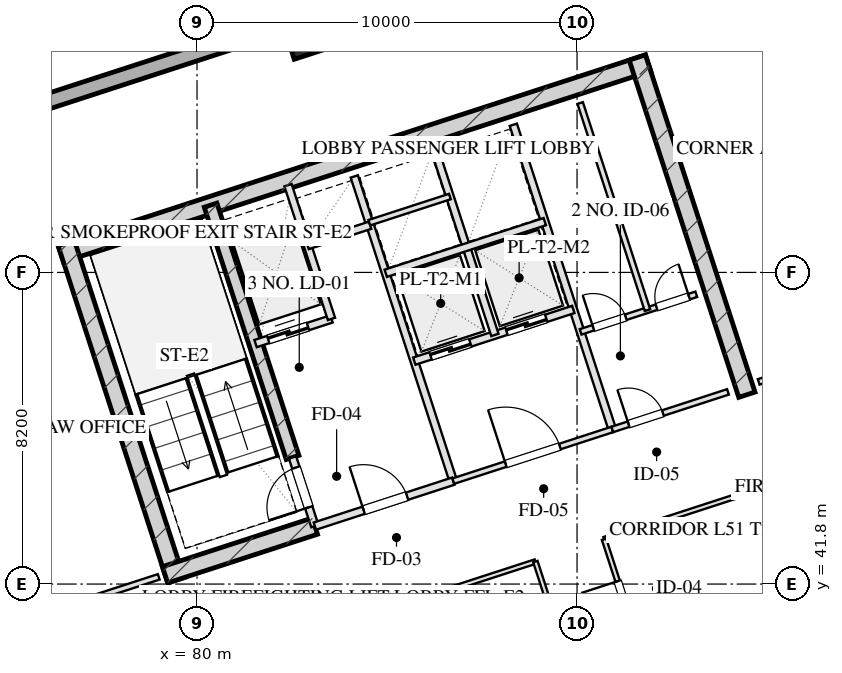
"""IFC4 building model, lengths in metres.
Left out: names, types, materials, properties, quantities, classifications, styles, units other than length and angle.
Written with IfcOpenShell. Run it as: python <this file> out.ifc"""

import sys

from ifc_helpers import new_model, si_unit, direction, frame, frame_2d, origin, origin_2d, place, context, subcontext, project, spatial, rectangle, hollow_rectangle, extrude, element, fill, save


model = new_model("IFC4")
c1 = context("Model", 3, precision=1e-05, world=origin(), true_north=direction((0.0, 1.0)))
c2 = subcontext(c1, "Body", "Model", "MODEL_VIEW")
j1 = project(units=[si_unit("LENGTHUNIT", "METRE"), si_unit("PLANEANGLEUNIT", "RADIAN")], contexts=[c1])
p1 = place(None, origin())
s1 = spatial("IfcSite", under=j1, at=p1, CompositionType="ELEMENT")
p2 = place(p1, origin())
s2 = spatial("IfcBuilding", under=s1, at=p2, CompositionType="ELEMENT")
p3 = place(p2, frame((0.0, 0.0, 192.05)))
s3 = spatial("IfcBuildingStorey", under=s2, at=p3, CompositionType="ELEMENT", Elevation=192.05)
p4 = place(p3, frame((76.415, 50.489, 0.0), z_axis=(0.0, 0.0, 1.0), x_axis=(0.951056810414, 0.309016089169, 0.0)))
e1 = element("IfcWall", 1, at=p4, inside=s3, PredefinedType="SHEAR", context=c2, shape_type="SweptSolid", body=[
    extrude(rectangle(XDim=16.25, YDim=0.45, at=frame_2d((8.125, 0.0))), origin(), (0.0, 0.0, 1.0), 3.45),
])
for number, where, z_axis, x_axis in (
    (2, (79.442, 41.899, 0.0), (0.0, 0.0, 1.0), (-0.309, 0.951, 0.0)),
    (3, (94.469, 46.781, 0.0), (0.0, 0.0, 1.0), (-0.309, 0.951, 0.0)),
):
    element("IfcWall", number, at=place(p3, frame(where, z_axis=z_axis, x_axis=x_axis)), inside=s3, PredefinedType="SHEAR", context=c2, shape_type="SweptSolid", body=[
        extrude(rectangle(XDim=9.33, YDim=0.45, at=frame_2d((4.665, 0.0))), origin(), (0.0, 0.0, 1.0), 3.45),
    ])
p5 = place(p3, frame((82.514, 45.131, 0.0), z_axis=(0.0, 0.0, 1.0), x_axis=(-0.308988790936, 0.951065679686, 0.0)))
e4 = element("IfcWall", 4, at=p5, inside=s3, PredefinedType="SHEAR", context=c2, shape_type="SweptSolid", body=[
    extrude(rectangle(XDim=6.98, YDim=0.35, at=frame_2d((3.49, 0.0))), origin(), (0.0, 0.0, 1.0), 3.45),
])
p6 = place(p3, frame((79.159, 42.043, 0.0), z_axis=(0.0, 0.0, 1.0), x_axis=(0.951047485828, 0.309044785913, 0.0)))
e5 = element("IfcWall", 5, at=p6, inside=s3, PredefinedType="SHEAR", context=c2, shape_type="SweptSolid", body=[
    extrude(rectangle(XDim=4.145, YDim=0.45, at=frame_2d((2.073, 0.0))), origin(), (0.0, 0.0, 1.0), 3.45),
])
p7 = place(p3, frame((82.815, 56.112, 0.0), z_axis=(0.0, 0.0, 1.0), x_axis=(0.951056516295, 0.309016994375, 0.0)))
e6 = element("IfcColumn", 6, at=p7, inside=s3, PredefinedType="COLUMN", context=c2, shape_type="SweptSolid", body=[
    extrude(hollow_rectangle(XDim=0.8, YDim=0.8, WallThickness=0.028, at=origin_2d()), origin(), (0.0, 0.0, 1.0), 3.451),
])
p8 = place(p3, frame((81.776, 8.827, 0.0), z_axis=(0.0, 0.0, 1.0), x_axis=(-0.309014228706, 0.951057414911, 0.0)))
e7 = element("IfcWall", 7, at=p8, inside=s3, PredefinedType="SOLIDWALL", context=c2, shape_type="SweptSolid", body=[
    extrude(rectangle(XDim=42.8, YDim=0.4, at=frame_2d((21.4, 0.0))), origin(), (0.0, 0.0, 1.0), 2.61),
])
p9 = place(p8, frame((13.95, 0.0, 0.75)))
e8 = element("IfcOpeningElement", 8, at=p9, cuts=e7, PredefinedType="OPENING", context=c2, shape_type="SweptSolid", body=[
    extrude(rectangle(XDim=2.1, YDim=1.46, at=frame_2d((1.05, 0.73))), frame((0.0, 0.21, 0.0), z_axis=(0.0, -1.0, 0.0), x_axis=(1.0, 0.0, 0.0)), (0.0, 0.0, 1.0), 0.42),
])
p10 = place(p8, frame((17.75, 0.0, 0.75)))
e9 = element("IfcOpeningElement", 9, at=p10, cuts=e7, PredefinedType="OPENING", context=c2, shape_type="SweptSolid", body=[
    extrude(rectangle(XDim=2.1, YDim=1.46, at=frame_2d((1.05, 0.73))), frame((0.0, 0.21, 0.0), z_axis=(0.0, -1.0, 0.0), x_axis=(1.0, 0.0, 0.0)), (0.0, 0.0, 1.0), 0.42),
])
p11 = place(p8, frame((22.95, 0.0, 0.75)))
e10 = element("IfcOpeningElement", 10, at=p11, cuts=e7, PredefinedType="OPENING", context=c2, shape_type="SweptSolid", body=[
    extrude(rectangle(XDim=2.1, YDim=1.46, at=frame_2d((1.05, 0.73))), frame((0.0, 0.21, 0.0), z_axis=(0.0, -1.0, 0.0), x_axis=(1.0, 0.0, 0.0)), (0.0, 0.0, 1.0), 0.42),
])
p12 = place(p8, frame((26.75, 0.0, 0.75)))
e11 = element("IfcOpeningElement", 11, at=p12, cuts=e7, PredefinedType="OPENING", context=c2, shape_type="SweptSolid", body=[
    extrude(rectangle(XDim=2.1, YDim=1.46, at=frame_2d((1.05, 0.73))), frame((0.0, 0.21, 0.0), z_axis=(0.0, -1.0, 0.0), x_axis=(1.0, 0.0, 0.0)), (0.0, 0.0, 1.0), 0.42),
])
p13 = place(p3, frame((70.092, 52.556, 0.0), z_axis=(0.0, 0.0, 1.0), x_axis=(0.951057580055, 0.30901372044, 0.0)))
e12 = element("IfcWall", 12, at=p13, inside=s3, PredefinedType="SOLIDWALL", context=c2, shape_type="SweptSolid", body=[
    extrude(rectangle(XDim=26.4, YDim=0.4, at=frame_2d((13.2, 0.0))), origin(), (0.0, 0.0, 1.0), 2.61),
])
p14 = place(p3, frame((83.101, 43.324, 0.0), z_axis=(0.0, 0.0, 1.0), x_axis=(-0.309048298632, 0.951046344356, 0.0)))
e13 = element("IfcWall", 13, at=p14, inside=s3, PredefinedType="PARTITIONING", context=c2, shape_type="SweptSolid", body=[
    extrude(rectangle(XDim=1.9, YDim=0.2, at=frame_2d((0.95, 0.0))), origin(), (0.0, 0.0, 1.0), 3.175),
])
p15 = place(p14, frame((0.52, 0.0, 0.0)))
e14 = element("IfcOpeningElement", 14, at=p15, cuts=e13, PredefinedType="OPENING", context=c2, shape_type="SweptSolid", body=[
    extrude(rectangle(XDim=1.1, YDim=2.05, at=frame_2d((0.55, 1.025))), frame((0.0, 0.11, 0.0), z_axis=(0.0, -1.0, 0.0), x_axis=(1.0, 0.0, 0.0)), (0.0, 0.0, 1.0), 0.22),
])
p16 = place(p3, frame((86.743, 44.508, 0.0), z_axis=(0.0, 0.0, 1.0), x_axis=(-0.309016001439, 0.951056838919, 0.0)))
e15 = element("IfcWall", 15, at=p16, inside=s3, PredefinedType="PARTITIONING", context=c2, shape_type="SweptSolid", body=[
    extrude(rectangle(XDim=8.43, YDim=0.2, at=frame_2d((4.215, 0.0))), origin(), (0.0, 0.0, 1.0), 3.175),
])
p17 = place(p3, frame((83.101, 43.324, 0.0), z_axis=(0.0, 0.0, 1.0), x_axis=(0.951052804469, 0.309028417967, 0.0)))
e16 = element("IfcWall", 16, at=p17, inside=s3, PredefinedType="PARTITIONING", context=c2, shape_type="SweptSolid", body=[
    extrude(rectangle(XDim=3.83, YDim=0.2, at=frame_2d((1.915, 0.0))), origin(), (0.0, 0.0, 1.0), 3.175),
])
p18 = place(p17, frame((1.35, 0.0, 0.0)))
e17 = element("IfcOpeningElement", 17, at=p18, cuts=e16, PredefinedType="OPENING", context=c2, shape_type="SweptSolid", body=[
    extrude(rectangle(XDim=1.2, YDim=2.05, at=frame_2d((0.6, 1.025))), frame((0.0, 0.11, 0.0), z_axis=(0.0, -1.0, 0.0), x_axis=(1.0, 0.0, 0.0)), (0.0, 0.0, 1.0), 0.22),
])
p19 = place(p3, frame((81.54, 48.127, 0.0), z_axis=(0.0, 0.0, 1.0), x_axis=(0.951062257173, 0.308999325213, 0.0)))
e18 = element("IfcWall", 18, at=p19, inside=s3, PredefinedType="PARTITIONING", context=c2, shape_type="SweptSolid", body=[
    extrude(rectangle(XDim=2.1, YDim=0.2, at=frame_2d((1.05, 0.0))), origin(), (0.0, 0.0, 1.0), 3.175),
])
p20 = place(p19, frame((0.35, 0.0, 0.0)))
e19 = element("IfcOpeningElement", 19, at=p20, cuts=e18, PredefinedType="OPENING", context=c2, shape_type="SweptSolid", body=[
    extrude(rectangle(XDim=1.1, YDim=2.05, at=frame_2d((0.55, 1.025))), frame((0.0, 0.11, 0.0), z_axis=(0.0, -1.0, 0.0), x_axis=(1.0, 0.0, 0.0)), (0.0, 0.0, 1.0), 0.22),
])
p21 = place(p3, frame((83.538, 48.776, 0.0), z_axis=(0.0, 0.0, 1.0), x_axis=(-0.3089935693, 0.951064127245, 0.0)))
e20 = element("IfcWall", 20, at=p21, inside=s3, PredefinedType="PARTITIONING", context=c2, shape_type="SweptSolid", body=[
    extrude(rectangle(XDim=3.7, YDim=0.2, at=frame_2d((1.85, 0.0))), origin(), (0.0, 0.0, 1.0), 3.175),
])
p22 = place(p3, frame((82.91, 50.707, 0.0), z_axis=(0.0, 0.0, 1.0), x_axis=(0.951041328149, 0.309063734775, 0.0)))
e21 = element("IfcWall", 21, at=p22, inside=s3, PredefinedType="PARTITIONING", context=c2, shape_type="SweptSolid", body=[
    extrude(rectangle(XDim=1.73, YDim=0.2, at=frame_2d((0.865, 0.0))), origin(), (0.0, 0.0, 1.0), 3.175),
])
p23 = place(p3, frame((90.928, 45.868, 0.0), z_axis=(0.0, 0.0, 1.0), x_axis=(-0.309042196757, 0.951048327176, 0.0)))
e22 = element("IfcWall", 22, at=p23, inside=s3, PredefinedType="PARTITIONING", context=c2, shape_type="SweptSolid", body=[
    extrude(rectangle(XDim=8.43, YDim=0.2, at=frame_2d((4.215, 0.0))), origin(), (0.0, 0.0, 1.0), 3.175),
])
p24 = place(p3, frame((86.743, 44.508, 0.0), z_axis=(0.0, 0.0, 1.0), x_axis=(0.951063829732, 0.308994485023, 0.0)))
e23 = element("IfcWall", 23, at=p24, inside=s3, PredefinedType="PARTITIONING", context=c2, shape_type="SweptSolid", body=[
    extrude(rectangle(XDim=4.4, YDim=0.15, at=frame_2d((2.2, 0.0))), origin(), (0.0, 0.0, 1.0), 3.175),
])
p25 = place(p24, frame((1.45, 0.0, 0.0)))
e24 = element("IfcOpeningElement", 24, at=p25, cuts=e23, PredefinedType="OPENING", context=c2, shape_type="SweptSolid", body=[
    extrude(rectangle(XDim=1.5, YDim=2.05, at=frame_2d((0.75, 1.025))), frame((0.0, 0.085, 0.0), z_axis=(0.0, -1.0, 0.0), x_axis=(1.0, 0.0, 0.0)), (0.0, 0.0, 1.0), 0.17),
])
p26 = place(p3, frame((85.718, 47.666, 0.0), z_axis=(0.0, 0.0, 1.0), x_axis=(0.951058531764, 0.30901079133, 0.0)))
e25 = element("IfcWall", 25, at=p26, inside=s3, PredefinedType="PARTITIONING", context=c2, shape_type="SweptSolid", body=[
    extrude(rectangle(XDim=4.4, YDim=0.2, at=frame_2d((2.2, 0.0))), origin(), (0.0, 0.0, 1.0), 3.175),
])
p27 = place(p26, frame((0.45, 0.0, 0.0)))
e26 = element("IfcOpeningElement", 26, at=p27, cuts=e25, PredefinedType="OPENING", context=c2, shape_type="SweptSolid", body=[
    extrude(rectangle(XDim=1.1, YDim=2.05, at=frame_2d((0.55, 1.025))), frame((0.0, 0.11, 0.0), z_axis=(0.0, -1.0, 0.0), x_axis=(1.0, 0.0, 0.0)), (0.0, 0.0, 1.0), 0.22),
])
p28 = place(p26, frame((2.55, 0.0, 0.0)))
e27 = element("IfcOpeningElement", 27, at=p28, cuts=e25, PredefinedType="OPENING", context=c2, shape_type="SweptSolid", body=[
    extrude(rectangle(XDim=1.1, YDim=2.05, at=frame_2d((0.55, 1.025))), frame((0.0, 0.11, 0.0), z_axis=(0.0, -1.0, 0.0), x_axis=(1.0, 0.0, 0.0)), (0.0, 0.0, 1.0), 0.22),
])
p29 = place(p3, frame((87.838, 48.354, 0.0), z_axis=(0.0, 0.0, 1.0), x_axis=(-0.3090093719, 0.951058992953, 0.0)))
e28 = element("IfcWall", 28, at=p29, inside=s3, PredefinedType="PARTITIONING", context=c2, shape_type="SweptSolid", body=[
    extrude(rectangle(XDim=5.11, YDim=0.2, at=frame_2d((2.555, 0.0))), origin(), (0.0, 0.0, 1.0), 3.175),
])
p30 = place(p3, frame((84.967, 49.977, 0.0), z_axis=(0.0, 0.0, 1.0), x_axis=(0.951063829732, 0.308994485023, 0.0)))
e29 = element("IfcWall", 29, at=p30, inside=s3, PredefinedType="PARTITIONING", context=c2, shape_type="SweptSolid", body=[
    extrude(rectangle(XDim=4.4, YDim=0.2, at=frame_2d((2.2, 0.0))), origin(), (0.0, 0.0, 1.0), 3.175),
])
p31 = place(p3, frame((84.534, 51.308, 0.0), z_axis=(0.0, 0.0, 1.0), x_axis=(0.951075093106, 0.308959814982, 0.0)))
e30 = element("IfcWall", 30, at=p31, inside=s3, PredefinedType="PARTITIONING", context=c2, shape_type="SweptSolid", body=[
    extrude(rectangle(XDim=2.23, YDim=0.15, at=frame_2d((1.115, 0.0))), origin(), (0.0, 0.0, 1.0), 3.175),
])
p32 = place(p3, frame((90.928, 45.868, 0.0), z_axis=(0.0, 0.0, 1.0), x_axis=(0.951059297078, 0.309008435874, 0.0)))
e31 = element("IfcWall", 31, at=p32, inside=s3, PredefinedType="PARTITIONING", context=c2, shape_type="SweptSolid", body=[
    extrude(rectangle(XDim=3.2, YDim=0.15, at=frame_2d((1.6, 0.0))), origin(), (0.0, 0.0, 1.0), 3.175),
])
p33 = place(p32, frame((0.45, 0.0, 0.0)))
e32 = element("IfcOpeningElement", 32, at=p33, cuts=e31, PredefinedType="OPENING", context=c2, shape_type="SweptSolid", body=[
    extrude(rectangle(XDim=0.95, YDim=2.05, at=frame_2d((0.475, 1.025))), frame((0.0, 0.085, 0.0), z_axis=(0.0, -1.0, 0.0), x_axis=(1.0, 0.0, 0.0)), (0.0, 0.0, 1.0), 0.17),
])
p34 = place(p3, frame((90.094, 48.436, 0.0), z_axis=(0.0, 0.0, 1.0), x_axis=(0.951066581729, 0.308986014439, 0.0)))
e33 = element("IfcWall", 33, at=p34, inside=s3, PredefinedType="PARTITIONING", context=c2, shape_type="SweptSolid", body=[
    extrude(rectangle(XDim=3.2, YDim=0.15, at=frame_2d((1.6, 0.0))), origin(), (0.0, 0.0, 1.0), 3.175),
])
p35 = place(p34, frame((0.35, 0.0, 0.0)))
e34 = element("IfcOpeningElement", 34, at=p35, cuts=e33, PredefinedType="OPENING", context=c2, shape_type="SweptSolid", body=[
    extrude(rectangle(XDim=0.9, YDim=2.05, at=frame_2d((0.45, 1.025))), frame((0.0, 0.085, 0.0), z_axis=(0.0, -1.0, 0.0), x_axis=(1.0, 0.0, 0.0)), (0.0, 0.0, 1.0), 0.17),
])
p36 = place(p34, frame((2.1, 0.0, 0.0)))
e35 = element("IfcOpeningElement", 35, at=p36, cuts=e33, PredefinedType="OPENING", context=c2, shape_type="SweptSolid", body=[
    extrude(rectangle(XDim=0.9, YDim=2.05, at=frame_2d((0.45, 1.025))), frame((0.0, 0.085, 0.0), z_axis=(0.0, -1.0, 0.0), x_axis=(1.0, 0.0, 0.0)), (0.0, 0.0, 1.0), 0.17),
])
p37 = place(p3, frame((91.853, 49.007, 0.0), z_axis=(0.0, 0.0, 1.0), x_axis=(-0.309022487551, 0.951054731437, 0.0)))
e36 = element("IfcWall", 36, at=p37, inside=s3, PredefinedType="PARTITIONING", context=c2, shape_type="SweptSolid", body=[
    extrude(rectangle(XDim=5.73, YDim=0.15, at=frame_2d((2.865, 0.0))), origin(), (0.0, 0.0, 1.0), 3.175),
])
p38 = place(p3, frame((71.955, 39.703, 0.0), z_axis=(0.0, 0.0, 1.0), x_axis=(0.951060977215, 0.309003264738, 0.0)))
e37 = element("IfcWall", 37, at=p38, inside=s3, PredefinedType="PARTITIONING", context=c2, shape_type="SweptSolid", body=[
    extrude(rectangle(XDim=7.4, YDim=0.15, at=frame_2d((3.7, 0.0))), origin(), (0.0, 0.0, 1.0), 3.175),
])
p39 = place(p38, frame((3.108, 0.0, 0.0)))
e38 = element("IfcOpeningElement", 38, at=p39, cuts=e37, PredefinedType="OPENING", context=c2, shape_type="SweptSolid", body=[
    extrude(rectangle(XDim=1.0, YDim=2.05, at=frame_2d((0.5, 1.025))), frame((0.0, 0.085, 0.0), z_axis=(0.0, -1.0, 0.0), x_axis=(1.0, 0.0, 0.0)), (0.0, 0.0, 1.0), 0.17),
])
p40 = place(p3, frame((94.78, 47.119, 0.0), z_axis=(0.0, 0.0, 1.0), x_axis=(0.951057811516, 0.309013008068, 0.0)))
e39 = element("IfcWall", 39, at=p40, inside=s3, PredefinedType="PARTITIONING", context=c2, shape_type="SweptSolid", body=[
    extrude(rectangle(XDim=6.8, YDim=0.15, at=frame_2d((3.4, 0.0))), origin(), (0.0, 0.0, 1.0), 3.175),
])
p41 = place(p40, frame((2.856, 0.0, 0.0)))
e40 = element("IfcOpeningElement", 40, at=p41, cuts=e39, PredefinedType="OPENING", context=c2, shape_type="SweptSolid", body=[
    extrude(rectangle(XDim=1.0, YDim=2.05, at=frame_2d((0.5, 1.025))), frame((0.0, 0.085, 0.0), z_axis=(0.0, -1.0, 0.0), x_axis=(1.0, 0.0, 0.0)), (0.0, 0.0, 1.0), 0.17),
])
p42 = place(p3, frame((83.672, 40.692, 0.0), z_axis=(0.0, 0.0, 1.0), x_axis=(0.951048747115, 0.30904090443, 0.0)))
e41 = element("IfcWall", 41, at=p42, inside=s3, PredefinedType="PARTITIONING", context=c2, shape_type="SweptSolid", body=[
    extrude(rectangle(XDim=5.5, YDim=0.12, at=frame_2d((2.75, 0.0))), origin(), (0.0, 0.0, 1.0), 3.175),
])
p43 = place(p3, frame((90.71, 42.979, 0.0), z_axis=(0.0, 0.0, 1.0), x_axis=(0.95105853842, 0.309010770845, 0.0)))
e42 = element("IfcWall", 42, at=p43, inside=s3, PredefinedType="PARTITIONING", context=c2, shape_type="SweptSolid", body=[
    extrude(rectangle(XDim=11.95, YDim=0.12, at=frame_2d((5.975, 0.0))), origin(), (0.0, 0.0, 1.0), 3.175),
])
p44 = place(p3, frame((94.045, 26.566, 0.0), z_axis=(0.0, 0.0, 1.0), x_axis=(-0.30901773025, 0.951056277195, 0.0)))
e43 = element("IfcWall", 43, at=p44, inside=s3, PredefinedType="PARTITIONING", context=c2, shape_type="SweptSolid", body=[
    extrude(rectangle(XDim=16.64, YDim=0.12, at=frame_2d((8.32, 0.0))), origin(), (0.0, 0.0, 1.0), 3.175),
])
p45 = place(p3, frame((95.852, 27.153, 0.0), z_axis=(0.0, 0.0, 1.0), x_axis=(-0.309004459387, 0.951060589068, 0.0)))
e44 = element("IfcWall", 44, at=p45, inside=s3, PredefinedType="PARTITIONING", context=c2, shape_type="SweptSolid", body=[
    extrude(rectangle(XDim=16.64, YDim=0.12, at=frame_2d((8.32, 0.0))), origin(), (0.0, 0.0, 1.0), 3.175),
])
p46 = place(p45, frame((1.16, 0.0, 0.0)))
e45 = element("IfcOpeningElement", 45, at=p46, cuts=e44, PredefinedType="OPENING", context=c2, shape_type="SweptSolid", body=[
    extrude(rectangle(XDim=1.0, YDim=2.05, at=frame_2d((0.5, 1.025))), frame((0.0, 0.07, 0.0), z_axis=(0.0, -1.0, 0.0), x_axis=(1.0, 0.0, 0.0)), (0.0, 0.0, 1.0), 0.14),
])
p47 = place(p45, frame((4.72, 0.0, 0.0)))
e46 = element("IfcOpeningElement", 46, at=p47, cuts=e44, PredefinedType="OPENING", context=c2, shape_type="SweptSolid", body=[
    extrude(rectangle(XDim=1.0, YDim=2.05, at=frame_2d((0.5, 1.025))), frame((0.0, 0.07, 0.0), z_axis=(0.0, -1.0, 0.0), x_axis=(1.0, 0.0, 0.0)), (0.0, 0.0, 1.0), 0.14),
])
p48 = place(p45, frame((7.82, 0.0, 0.0)))
e47 = element("IfcOpeningElement", 47, at=p48, cuts=e44, PredefinedType="OPENING", context=c2, shape_type="SweptSolid", body=[
    extrude(rectangle(XDim=1.0, YDim=2.05, at=frame_2d((0.5, 1.025))), frame((0.0, 0.07, 0.0), z_axis=(0.0, -1.0, 0.0), x_axis=(1.0, 0.0, 0.0)), (0.0, 0.0, 1.0), 0.14),
])
p49 = place(p45, frame((10.92, 0.0, 0.0)))
e48 = element("IfcOpeningElement", 48, at=p49, cuts=e44, PredefinedType="OPENING", context=c2, shape_type="SweptSolid", body=[
    extrude(rectangle(XDim=1.0, YDim=2.05, at=frame_2d((0.5, 1.025))), frame((0.0, 0.07, 0.0), z_axis=(0.0, -1.0, 0.0), x_axis=(1.0, 0.0, 0.0)), (0.0, 0.0, 1.0), 0.14),
])
p50 = place(p45, frame((14.48, 0.0, 0.0)))
e49 = element("IfcOpeningElement", 49, at=p50, cuts=e44, PredefinedType="OPENING", context=c2, shape_type="SweptSolid", body=[
    extrude(rectangle(XDim=1.0, YDim=2.05, at=frame_2d((0.5, 1.025))), frame((0.0, 0.07, 0.0), z_axis=(0.0, -1.0, 0.0), x_axis=(1.0, 0.0, 0.0)), (0.0, 0.0, 1.0), 0.14),
])
p51 = place(p3, frame((91.736, 39.821, 0.0), z_axis=(0.0, 0.0, 1.0), x_axis=(0.951052534024, 0.309029250277, 0.0)))
e50 = element("IfcWall", 50, at=p51, inside=s3, PredefinedType="PARTITIONING", context=c2, shape_type="SweptSolid", body=[
    extrude(rectangle(XDim=11.95, YDim=0.12, at=frame_2d((5.975, 0.0))), origin(), (0.0, 0.0, 1.0), 3.175),
])
p52 = place(p15, origin())
e51 = element("IfcDoor", 51, at=p52, inside=s3, OperationType="SINGLE_SWING_LEFT", PredefinedType="DOOR", context=c2, shape_type="SweptSolid", body=[
    extrude(rectangle(XDim=1.1, YDim=2.05, at=frame_2d((0.55, 1.025))), frame((0.0, 0.025, 0.0), z_axis=(0.0, -1.0, 0.0), x_axis=(1.0, 0.0, 0.0)), (0.0, 0.0, 1.0), 0.05),
])
fill(e14, e51)
p53 = place(p18, origin())
e52 = element("IfcDoor", 52, at=p53, inside=s3, OperationType="SINGLE_SWING_LEFT", PredefinedType="DOOR", context=c2, shape_type="SweptSolid", body=[
    extrude(rectangle(XDim=1.2, YDim=2.05, at=frame_2d((0.6, 1.025))), frame((0.0, 0.025, 0.0), z_axis=(0.0, -1.0, 0.0), x_axis=(1.0, 0.0, 0.0)), (0.0, 0.0, 1.0), 0.05),
])
fill(e17, e52)
p54 = place(p20, origin())
e53 = element("IfcDoor", 53, at=p54, inside=s3, OperationType="DOUBLE_DOOR_SLIDING", PredefinedType="DOOR", context=c2, shape_type="SweptSolid", body=[
    extrude(rectangle(XDim=1.1, YDim=2.05, at=frame_2d((0.55, 1.025))), frame((0.0, 0.025, 0.0), z_axis=(0.0, -1.0, 0.0), x_axis=(1.0, 0.0, 0.0)), (0.0, 0.0, 1.0), 0.05),
])
fill(e19, e53)
p55 = place(p25, origin())
e54 = element("IfcDoor", 54, at=p55, inside=s3, OperationType="SINGLE_SWING_LEFT", PredefinedType="DOOR", context=c2, shape_type="SweptSolid", body=[
    extrude(rectangle(XDim=1.5, YDim=2.05, at=frame_2d((0.75, 1.025))), frame((0.0, 0.025, 0.0), z_axis=(0.0, -1.0, 0.0), x_axis=(1.0, 0.0, 0.0)), (0.0, 0.0, 1.0), 0.05),
])
fill(e24, e54)
p56 = place(p27, origin())
e55 = element("IfcDoor", 55, at=p56, inside=s3, OperationType="DOUBLE_DOOR_SLIDING", PredefinedType="DOOR", context=c2, shape_type="SweptSolid", body=[
    extrude(rectangle(XDim=1.1, YDim=2.05, at=frame_2d((0.55, 1.025))), frame((0.0, 0.025, 0.0), z_axis=(0.0, -1.0, 0.0), x_axis=(1.0, 0.0, 0.0)), (0.0, 0.0, 1.0), 0.05),
])
fill(e26, e55)
p57 = place(p28, origin())
e56 = element("IfcDoor", 56, at=p57, inside=s3, OperationType="DOUBLE_DOOR_SLIDING", PredefinedType="DOOR", context=c2, shape_type="SweptSolid", body=[
    extrude(rectangle(XDim=1.1, YDim=2.05, at=frame_2d((0.55, 1.025))), frame((0.0, 0.025, 0.0), z_axis=(0.0, -1.0, 0.0), x_axis=(1.0, 0.0, 0.0)), (0.0, 0.0, 1.0), 0.05),
])
fill(e27, e56)
p58 = place(p33, origin())
e57 = element("IfcDoor", 57, at=p58, inside=s3, OperationType="SINGLE_SWING_LEFT", PredefinedType="DOOR", context=c2, shape_type="SweptSolid", body=[
    extrude(rectangle(XDim=0.95, YDim=2.05, at=frame_2d((0.475, 1.025))), frame((0.0, 0.025, 0.0), z_axis=(0.0, -1.0, 0.0), x_axis=(1.0, 0.0, 0.0)), (0.0, 0.0, 1.0), 0.05),
])
fill(e32, e57)
p59 = place(p35, origin())
e58 = element("IfcDoor", 58, at=p59, inside=s3, OperationType="SINGLE_SWING_LEFT", PredefinedType="DOOR", context=c2, shape_type="SweptSolid", body=[
    extrude(rectangle(XDim=0.9, YDim=2.05, at=frame_2d((0.45, 1.025))), frame((0.0, 0.025, 0.0), z_axis=(0.0, -1.0, 0.0), x_axis=(1.0, 0.0, 0.0)), (0.0, 0.0, 1.0), 0.05),
])
fill(e34, e58)
p60 = place(p36, origin())
e59 = element("IfcDoor", 59, at=p60, inside=s3, OperationType="SINGLE_SWING_RIGHT", PredefinedType="DOOR", context=c2, shape_type="SweptSolid", body=[
    extrude(rectangle(XDim=0.9, YDim=2.05, at=frame_2d((0.45, 1.025))), frame((0.0, 0.025, 0.0), z_axis=(0.0, -1.0, 0.0), x_axis=(1.0, 0.0, 0.0)), (0.0, 0.0, 1.0), 0.05),
])
fill(e35, e59)
p61 = place(p50, origin())
e60 = element("IfcDoor", 60, at=p61, inside=s3, OperationType="SINGLE_SWING_RIGHT", PredefinedType="DOOR", context=c2, shape_type="SweptSolid", body=[
    extrude(rectangle(XDim=1.0, YDim=2.05, at=frame_2d((0.5, 1.025))), frame((0.0, 0.025, 0.0), z_axis=(0.0, -1.0, 0.0), x_axis=(1.0, 0.0, 0.0)), (0.0, 0.0, 1.0), 0.05),
])
fill(e49, e60)
save(model, sys.argv[1])
